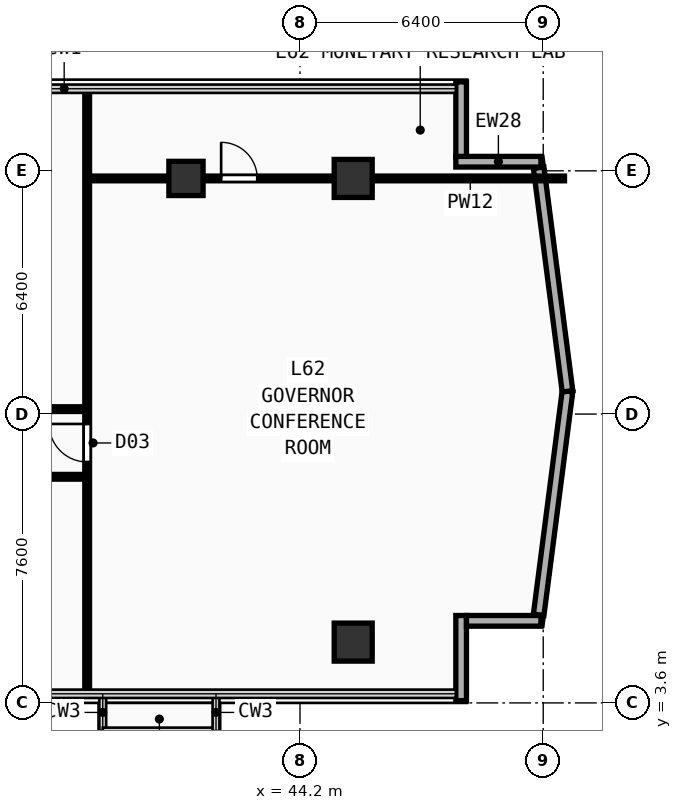
"""IFC4 building model, lengths in metres.
Left out: names, types, materials, properties, quantities, classifications, styles, units other than length and angle.
Written with IfcOpenShell. Run it as: python <this file> out.ifc"""

import sys

from ifc_helpers import new_model, si_unit, direction, frame, frame_2d, origin, origin_2d, place, context, subcontext, project, spatial, rectangle, extrude, element, fill, save


model = new_model("IFC4")
c1 = context("Model", 3, precision=1e-05, world=origin(), true_north=direction((0.0, 1.0)))
c2 = subcontext(c1, "Body", "Model", "MODEL_VIEW")
j1 = project(units=[si_unit("LENGTHUNIT", "METRE"), si_unit("PLANEANGLEUNIT", "RADIAN")], contexts=[c1])
p1 = place(None, origin())
s1 = spatial("IfcSite", under=j1, at=p1, CompositionType="ELEMENT")
p2 = place(p1, origin())
s2 = spatial("IfcBuilding", under=s1, at=p2, CompositionType="ELEMENT")
p3 = place(p2, frame((0.0, 0.0, 242.5)))
s3 = spatial("IfcBuildingStorey", under=s2, at=p3, CompositionType="ELEMENT", Elevation=242.5)
for number, where, z_axis, x_axis in (
    (1, (45.6, 5.2, 0.0), (0.0, 0.0, 1.0), (1.0, 0.0, 0.0)),
    (2, (45.6, 17.4, 0.0), (0.0, 0.0, 1.0), (1.0, 0.0, 0.0)),
):
    element("IfcColumn", number, at=place(p3, frame(where, z_axis=z_axis, x_axis=x_axis)), inside=s3, PredefinedType="COLUMN", context=c2, shape_type="SweptSolid", body=[
        extrude(rectangle(XDim=1.0, YDim=1.0, at=origin_2d()), origin(), (0.0, 0.0, 1.0), 3.56),
    ])
p4 = place(p3, frame((41.2, 17.4, 0.0), z_axis=(0.0, 0.0, 1.0), x_axis=(1.0, 0.0, 0.0)))
e3 = element("IfcColumn", 3, at=p4, inside=s3, PredefinedType="COLUMN", context=c2, shape_type="SweptSolid", body=[
    extrude(rectangle(XDim=0.9, YDim=0.9, at=origin_2d()), origin(), (0.0, 0.0, 1.0), 3.56),
])
p5 = place(p3, frame((48.44, 3.66, 0.0), z_axis=(0.0, 0.0, 1.0), x_axis=(0.0, 1.0, 0.0)))
e4 = element("IfcWall", 4, at=p5, inside=s3, PredefinedType="SOLIDWALL", context=c2, shape_type="SweptSolid", body=[
    extrude(rectangle(XDim=2.24, YDim=0.28, at=frame_2d((1.12, 0.0))), origin(), (0.0, 0.0, 1.0), 3.56),
])
p6 = place(p3, frame((48.58, 5.76, 0.0), z_axis=(0.0, 0.0, 1.0), x_axis=(1.0, 0.0, 0.0)))
e5 = element("IfcWall", 5, at=p6, inside=s3, PredefinedType="SOLIDWALL", context=c2, shape_type="SweptSolid", body=[
    extrude(rectangle(XDim=1.96, YDim=0.28, at=frame_2d((0.98, 0.0))), origin(), (0.0, 0.0, 1.0), 3.56),
])
p7 = place(p3, frame((48.44, 17.965, 0.0), z_axis=(0.0, 0.0, 1.0), x_axis=(0.0, 1.0, 0.0)))
e6 = element("IfcWall", 6, at=p7, inside=s3, PredefinedType="SOLIDWALL", context=c2, shape_type="SweptSolid", body=[
    extrude(rectangle(XDim=1.975, YDim=0.28, at=frame_2d((0.987, 0.0))), origin(), (0.0, 0.0, 1.0), 3.56),
])
p8 = place(p3, frame((48.3, 17.84, 0.0), z_axis=(0.0, 0.0, 1.0), x_axis=(1.0, 0.0, 0.0)))
e7 = element("IfcWall", 7, at=p8, inside=s3, PredefinedType="SOLIDWALL", context=c2, shape_type="SweptSolid", body=[
    extrude(rectangle(XDim=2.24, YDim=0.28, at=frame_2d((1.12, 0.0))), origin(), (0.0, 0.0, 1.0), 3.56),
])
for number, where, z_axis, x_axis in (
    (8, (50.48, 5.918, 0.0), (0.0, 0.0, 1.0), (0.128, 0.992, 0.0)),
    (9, (51.239, 11.799, 0.0), (0.0, 0.0, 1.0), (-0.128, 0.992, 0.0)),
):
    element("IfcWall", number, at=place(p3, frame(where, z_axis=z_axis, x_axis=x_axis)), inside=s3, PredefinedType="SOLIDWALL", context=c2, shape_type="SweptSolid", body=[
        extrude(rectangle(XDim=5.931, YDim=0.28, at=frame_2d((2.966, 0.0))), origin(), (0.0, 0.0, 1.0), 3.56),
    ])
p9 = place(p3, frame((29.4, 9.55, 0.0), z_axis=(0.0, 0.0, 1.0), x_axis=(1.0, 0.0, 0.0)))
e10 = element("IfcWall", 10, at=p9, inside=s3, PredefinedType="PARTITIONING", context=c2, shape_type="SweptSolid", body=[
    extrude(rectangle(XDim=9.2, YDim=0.125, at=frame_2d((4.6, 0.0))), origin(), (0.0, 0.0, 1.0), 3.2),
])
p10 = place(p9, frame((1.431, 0.0, 0.0)))
e11 = element("IfcOpeningElement", 11, at=p10, cuts=e10, PredefinedType="OPENING", context=c2, shape_type="SweptSolid", body=[
    extrude(rectangle(XDim=0.95, YDim=2.15, at=frame_2d((0.475, 1.075))), frame((0.0, 0.073, 0.0), z_axis=(0.0, -1.0, 0.0), x_axis=(1.0, 0.0, 0.0)), (0.0, 0.0, 1.0), 0.145),
])
p11 = place(p9, frame((5.63, 0.0, 0.0)))
e12 = element("IfcOpeningElement", 12, at=p11, cuts=e10, PredefinedType="OPENING", context=c2, shape_type="SweptSolid", body=[
    extrude(rectangle(XDim=0.95, YDim=2.15, at=frame_2d((0.475, 1.075))), frame((0.0, 0.073, 0.0), z_axis=(0.0, -1.0, 0.0), x_axis=(1.0, 0.0, 0.0)), (0.0, 0.0, 1.0), 0.145),
])
p12 = place(p3, frame((38.6, 3.84, 0.0), z_axis=(0.0, 0.0, 1.0), x_axis=(0.0, 1.0, 0.0)))
e13 = element("IfcWall", 13, at=p12, inside=s3, PredefinedType="PARTITIONING", context=c2, shape_type="SweptSolid", body=[
    extrude(rectangle(XDim=15.92, YDim=0.125, at=frame_2d((7.96, 0.0))), origin(), (0.0, 0.0, 1.0), 3.56),
])
p13 = place(p12, frame((6.1, 0.0, 0.0)))
e14 = element("IfcOpeningElement", 14, at=p13, cuts=e13, PredefinedType="OPENING", context=c2, shape_type="SweptSolid", body=[
    extrude(rectangle(XDim=1.0, YDim=2.2, at=frame_2d((0.5, 1.1))), frame((0.0, 0.073, 0.0), z_axis=(0.0, -1.0, 0.0), x_axis=(1.0, 0.0, 0.0)), (0.0, 0.0, 1.0), 0.145),
])
p14 = place(p3, frame((38.6, 17.4, 0.0), z_axis=(0.0, 0.0, 1.0), x_axis=(1.0, 0.0, 0.0)))
e15 = element("IfcWall", 15, at=p14, inside=s3, PredefinedType="PARTITIONING", context=c2, shape_type="SweptSolid", body=[
    extrude(rectangle(XDim=12.56, YDim=0.125, at=frame_2d((6.28, 0.0))), origin(), (0.0, 0.0, 1.0), 3.26),
])
p15 = place(p14, frame((3.525, 0.0, 0.0)))
e16 = element("IfcOpeningElement", 16, at=p15, cuts=e15, PredefinedType="OPENING", context=c2, shape_type="SweptSolid", body=[
    extrude(rectangle(XDim=0.95, YDim=2.15, at=frame_2d((0.475, 1.075))), frame((0.0, 0.073, 0.0), z_axis=(0.0, -1.0, 0.0), x_axis=(1.0, 0.0, 0.0)), (0.0, 0.0, 1.0), 0.145),
])
p16 = place(p3, frame((23.65, 11.33, 0.0), z_axis=(0.0, 0.0, 1.0), x_axis=(1.0, 0.0, 0.0)))
e17 = element("IfcWall", 17, at=p16, inside=s3, PredefinedType="PARTITIONING", context=c2, shape_type="SweptSolid", body=[
    extrude(rectangle(XDim=14.95, YDim=0.125, at=frame_2d((7.475, 0.0))), origin(), (0.0, 0.0, 1.0), 3.56),
])
p17 = place(p16, frame((2.965, 0.0, 0.0)))
e18 = element("IfcOpeningElement", 18, at=p17, cuts=e17, PredefinedType="OPENING", context=c2, shape_type="SweptSolid", body=[
    extrude(rectangle(XDim=0.95, YDim=2.15, at=frame_2d((0.475, 1.075))), frame((0.0, 0.073, 0.0), z_axis=(0.0, -1.0, 0.0), x_axis=(1.0, 0.0, 0.0)), (0.0, 0.0, 1.0), 0.145),
])
p18 = place(p16, frame((10.51, 0.0, 0.0)))
e19 = element("IfcOpeningElement", 19, at=p18, cuts=e17, PredefinedType="OPENING", context=c2, shape_type="SweptSolid", body=[
    extrude(rectangle(XDim=0.95, YDim=2.15, at=frame_2d((0.475, 1.075))), frame((0.0, 0.073, 0.0), z_axis=(0.0, -1.0, 0.0), x_axis=(1.0, 0.0, 0.0)), (0.0, 0.0, 1.0), 0.145),
])
p19 = place(p13, origin())
e20 = element("IfcDoor", 20, at=p19, inside=s3, OperationType="SINGLE_SWING_RIGHT", PredefinedType="DOOR", context=c2, shape_type="SweptSolid", body=[
    extrude(rectangle(XDim=1.0, YDim=2.2, at=frame_2d((0.5, 1.1))), frame((0.0, 0.025, 0.0), z_axis=(0.0, -1.0, 0.0), x_axis=(1.0, 0.0, 0.0)), (0.0, 0.0, 1.0), 0.05),
])
fill(e14, e20)
p20 = place(p15, origin())
e21 = element("IfcDoor", 21, at=p20, inside=s3, OperationType="SINGLE_SWING_LEFT", PredefinedType="DOOR", context=c2, shape_type="SweptSolid", body=[
    extrude(rectangle(XDim=0.95, YDim=2.15, at=frame_2d((0.475, 1.075))), frame((0.0, 0.025, 0.0), z_axis=(0.0, -1.0, 0.0), x_axis=(1.0, 0.0, 0.0)), (0.0, 0.0, 1.0), 0.05),
])
fill(e16, e21)
save(model, sys.argv[1])
